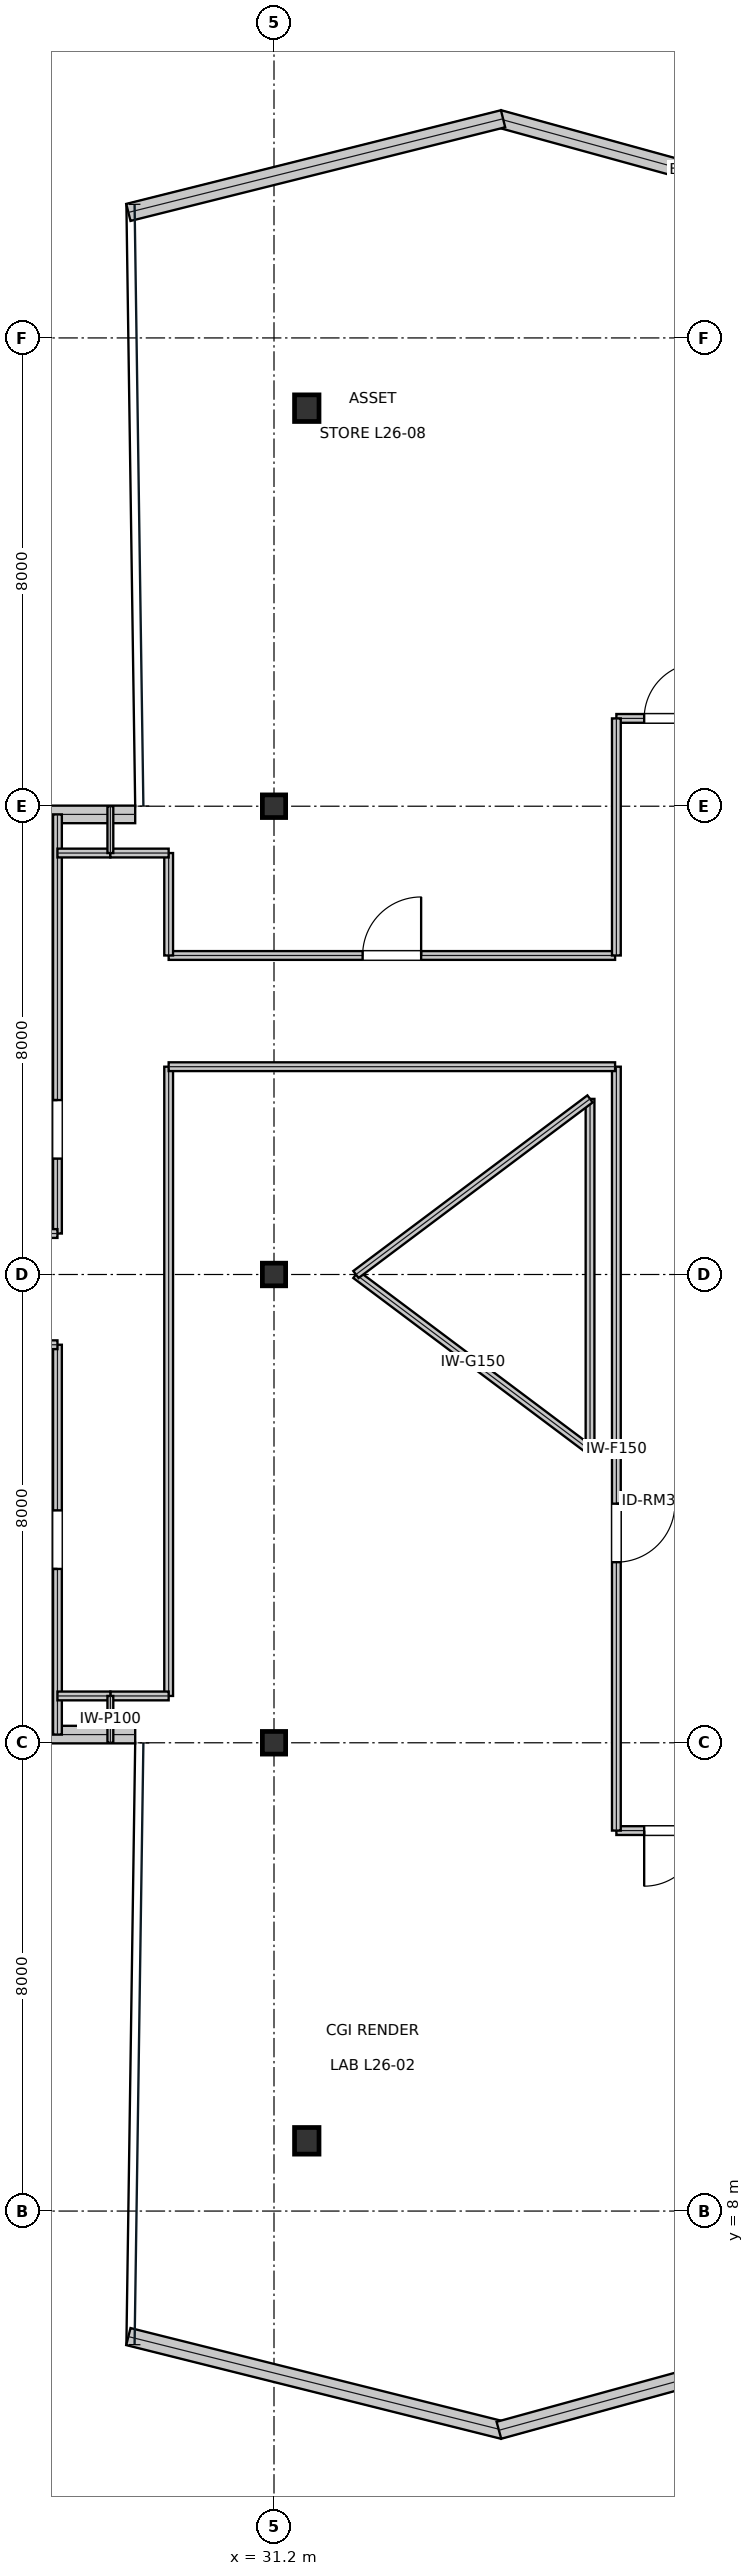
"""IFC4 building model, lengths in metres.
Left out: names, types, materials, properties, quantities, classifications, styles, units other than length and angle.
Written with IfcOpenShell. Run it as: python <this file> out.ifc"""

import sys

from ifc_helpers import new_model, si_unit, direction, frame, frame_2d, origin, origin_2d, place, context, subcontext, project, spatial, rectangle, i_section, extrude, element, fill, save


model = new_model("IFC4")
c1 = context("Model", 3, precision=1e-05, world=origin(), true_north=direction((0.0, 1.0)))
c2 = subcontext(c1, "Body", "Model", "MODEL_VIEW")
j1 = project(units=[si_unit("LENGTHUNIT", "METRE"), si_unit("PLANEANGLEUNIT", "RADIAN")], contexts=[c1])
p1 = place(None, origin())
s1 = spatial("IfcSite", under=j1, at=p1, CompositionType="ELEMENT")
p2 = place(p1, origin())
s2 = spatial("IfcBuilding", under=s1, at=p2, CompositionType="ELEMENT")
p3 = place(p2, frame((0.0, 0.0, 116.85)))
s3 = spatial("IfcBuildingStorey", under=s2, at=p3, CompositionType="ELEMENT", Elevation=116.85)
for number, where, z_axis, x_axis in (
    (1, (31.2, 16.0, 0.0), (0.0, 0.0, 1.0), (1.0, 0.0, 0.0)),
    (2, (31.2, 24.0, 0.0), (0.0, 0.0, 1.0), (1.0, 0.0, 0.0)),
    (3, (31.2, 32.0, 0.0), (0.0, 0.0, 1.0), (1.0, 0.0, 0.0)),
):
    element("IfcColumn", number, at=place(p3, frame(where, z_axis=z_axis, x_axis=x_axis)), inside=s3, PredefinedType="COLUMN", context=c2, shape_type="SweptSolid", body=[
        extrude(i_section(OverallWidth=0.398, OverallDepth=0.387, WebThickness=0.021, FlangeThickness=0.033, at=origin_2d()), origin(), (0.0, 0.0, 1.0), 4.044),
    ])
for number, where, z_axis, x_axis in (
    (4, (31.76, 38.8, 0.016), (0.0, 0.0, 1.0), (1.0, 0.0, 0.0)),
    (5, (31.76, 9.2, 0.016), (0.0, 0.0, 1.0), (1.0, 0.0, 0.0)),
):
    element("IfcColumn", number, at=place(p3, frame(where, z_axis=z_axis, x_axis=x_axis)), inside=s3, PredefinedType="COLUMN", context=c2, shape_type="SweptSolid", body=[
        extrude(i_section(OverallWidth=0.418, OverallDepth=0.455, WebThickness=0.042, FlangeThickness=0.068, at=origin_2d()), origin(), (0.0, 0.0, 1.0), 4.018),
    ])
p4 = place(p3, frame((41.445, 41.985, 0.0), z_axis=(0.0, 0.0, 1.0), x_axis=(-0.96422724659, 0.265077001894, 0.0)))
e6 = element("IfcWall", 6, at=p4, inside=s3, PredefinedType="STANDARD", context=c2, shape_type="SweptSolid", body=[
    extrude(rectangle(XDim=6.64, YDim=0.3, at=frame_2d((3.32, 0.0))), origin(), (0.0, 0.0, 1.0), 3.81),
])
p5 = place(p3, frame((35.114, 43.744, 0.0), z_axis=(0.0, 0.0, 1.0), x_axis=(-0.970168608955, -0.242431165897, 0.0)))
e7 = element("IfcWall", 7, at=p5, inside=s3, PredefinedType="STANDARD", context=c2, shape_type="SweptSolid", body=[
    extrude(rectangle(XDim=6.599, YDim=0.3, at=frame_2d((3.3, 0.0))), origin(), (0.0, 0.0, 1.0), 3.81),
])
for number, where, z_axis, x_axis in (
    (8, (28.828, 31.86, 0.0), (0.0, 0.0, 1.0), (-1.0, 0.0, 0.0)),
    (9, (26.04, 16.14, 0.0), (0.0, 0.0, 1.0), (1.0, 0.0, 0.0)),
):
    element("IfcWall", number, at=place(p3, frame(where, z_axis=z_axis, x_axis=x_axis)), inside=s3, PredefinedType="STANDARD", context=c2, shape_type="SweptSolid", body=[
        extrude(rectangle(XDim=2.788, YDim=0.3, at=frame_2d((1.394, 0.0))), origin(), (0.0, 0.0, 1.0), 3.81),
    ])
p6 = place(p3, frame((28.712, 5.856, 0.0), z_axis=(0.0, 0.0, 1.0), x_axis=(0.970168608955, -0.242431165897, 0.0)))
e10 = element("IfcWall", 10, at=p6, inside=s3, PredefinedType="STANDARD", context=c2, shape_type="SweptSolid", body=[
    extrude(rectangle(XDim=6.599, YDim=0.3, at=frame_2d((3.3, 0.0))), origin(), (0.0, 0.0, 1.0), 3.81),
])
p7 = place(p3, frame((35.043, 4.255, 0.0), z_axis=(0.0, 0.0, 1.0), x_axis=(0.96422724659, 0.265077001894, 0.0)))
e11 = element("IfcWall", 11, at=p7, inside=s3, PredefinedType="STANDARD", context=c2, shape_type="SweptSolid", body=[
    extrude(rectangle(XDim=6.64, YDim=0.3, at=frame_2d((3.32, 0.0))), origin(), (0.0, 0.0, 1.0), 3.81),
])
p8 = place(p3, frame((37.05, 14.5, 0.0), z_axis=(0.0, 0.0, 1.0), x_axis=(1.0, 0.0, 0.0)))
e12 = element("IfcWall", 12, at=p8, inside=s3, PredefinedType="PARTITIONING", context=c2, shape_type="SweptSolid", body=[
    extrude(rectangle(XDim=1.9, YDim=0.15, at=frame_2d((0.95, 0.0))), origin(), (0.0, 0.0, 1.0), 3.19),
])
p9 = place(p8, frame((0.475, 0.0, 0.0)))
e13 = element("IfcOpeningElement", 13, at=p9, cuts=e12, PredefinedType="OPENING", context=c2, shape_type="SweptSolid", body=[
    extrude(rectangle(XDim=0.95, YDim=2.15, at=frame_2d((0.475, 1.075))), frame((0.0, 0.085, 0.0), z_axis=(0.0, -1.0, 0.0), x_axis=(1.0, 0.0, 0.0)), (0.0, 0.0, 1.0), 0.17),
])
p10 = place(p3, frame((37.05, 14.5, 0.0), z_axis=(0.0, 0.0, 1.0), x_axis=(0.0, 1.0, 0.0)))
e14 = element("IfcWall", 14, at=p10, inside=s3, PredefinedType="PARTITIONING", context=c2, shape_type="SweptSolid", body=[
    extrude(rectangle(XDim=13.05, YDim=0.15, at=frame_2d((6.525, 0.0))), origin(), (0.0, 0.0, 1.0), 3.19),
])
p11 = place(p10, frame((4.585, 0.0, 0.0)))
e15 = element("IfcOpeningElement", 15, at=p11, cuts=e14, PredefinedType="OPENING", context=c2, shape_type="SweptSolid", body=[
    extrude(rectangle(XDim=1.0, YDim=2.15, at=frame_2d((0.5, 1.075))), frame((0.0, 0.085, 0.0), z_axis=(0.0, -1.0, 0.0), x_axis=(1.0, 0.0, 0.0)), (0.0, 0.0, 1.0), 0.17),
])
p12 = place(p3, frame((27.5, 16.14, 0.0), z_axis=(0.0, 0.0, 1.0), x_axis=(0.0, 1.0, 0.0)))
e16 = element("IfcWall", 16, at=p12, inside=s3, PredefinedType="PARTITIONING", context=c2, shape_type="SweptSolid", body=[
    extrude(rectangle(XDim=6.66, YDim=0.15, at=frame_2d((3.33, 0.0))), origin(), (0.0, 0.0, 1.0), 3.338),
])
p13 = place(p12, frame((2.83, 0.0, 0.0)))
e17 = element("IfcOpeningElement", 17, at=p13, cuts=e16, PredefinedType="OPENING", context=c2, shape_type="SweptSolid", body=[
    extrude(rectangle(XDim=1.0, YDim=2.15, at=frame_2d((0.5, 1.075))), frame((0.0, 0.085, 0.0), z_axis=(0.0, -1.0, 0.0), x_axis=(1.0, 0.0, 0.0)), (0.0, 0.0, 1.0), 0.17),
])
p14 = place(p3, frame((27.5, 24.7, 0.0), z_axis=(0.0, 0.0, 1.0), x_axis=(0.0, 1.0, 0.0)))
e18 = element("IfcWall", 18, at=p14, inside=s3, PredefinedType="PARTITIONING", context=c2, shape_type="SweptSolid", body=[
    extrude(rectangle(XDim=7.16, YDim=0.15, at=frame_2d((3.58, 0.0))), origin(), (0.0, 0.0, 1.0), 3.338),
])
p15 = place(p14, frame((1.28, 0.0, 0.0)))
e19 = element("IfcOpeningElement", 19, at=p15, cuts=e18, PredefinedType="OPENING", context=c2, shape_type="SweptSolid", body=[
    extrude(rectangle(XDim=1.0, YDim=2.15, at=frame_2d((0.5, 1.075))), frame((0.0, 0.085, 0.0), z_axis=(0.0, -1.0, 0.0), x_axis=(1.0, 0.0, 0.0)), (0.0, 0.0, 1.0), 0.17),
])
p16 = place(p3, frame((29.4, 29.45, 0.0), z_axis=(0.0, 0.0, 1.0), x_axis=(1.0, 0.0, 0.0)))
e20 = element("IfcWall", 20, at=p16, inside=s3, PredefinedType="PARTITIONING", context=c2, shape_type="SweptSolid", body=[
    extrude(rectangle(XDim=7.628, YDim=0.15, at=frame_2d((3.814, 0.0))), origin(), (0.0, 0.0, 1.0), 3.19),
])
p17 = place(p16, frame((3.314, 0.0, 0.0)))
e21 = element("IfcOpeningElement", 21, at=p17, cuts=e20, PredefinedType="OPENING", context=c2, shape_type="SweptSolid", body=[
    extrude(rectangle(XDim=1.0, YDim=2.15, at=frame_2d((0.5, 1.075))), frame((0.0, 0.085, 0.0), z_axis=(0.0, -1.0, 0.0), x_axis=(1.0, 0.0, 0.0)), (0.0, 0.0, 1.0), 0.17),
])
p18 = place(p3, frame((37.05, 33.5, 0.0), z_axis=(0.0, 0.0, 1.0), x_axis=(1.0, 0.0, 0.0)))
e22 = element("IfcWall", 22, at=p18, inside=s3, PredefinedType="PARTITIONING", context=c2, shape_type="SweptSolid", body=[
    extrude(rectangle(XDim=1.9, YDim=0.15, at=frame_2d((0.95, 0.0))), origin(), (0.0, 0.0, 1.0), 3.19),
])
p19 = place(p18, frame((0.475, 0.0, 0.0)))
e23 = element("IfcOpeningElement", 23, at=p19, cuts=e22, PredefinedType="OPENING", context=c2, shape_type="SweptSolid", body=[
    extrude(rectangle(XDim=0.95, YDim=2.15, at=frame_2d((0.475, 1.075))), frame((0.0, 0.085, 0.0), z_axis=(0.0, -1.0, 0.0), x_axis=(1.0, 0.0, 0.0)), (0.0, 0.0, 1.0), 0.17),
])
p20 = place(p3, frame((29.4, 16.8, 0.0), z_axis=(0.0, 0.0, 1.0), x_axis=(0.0, 1.0, 0.0)))
e24 = element("IfcWall", 24, at=p20, inside=s3, PredefinedType="PARTITIONING", context=c2, shape_type="SweptSolid", body=[
    extrude(rectangle(XDim=10.75, YDim=0.15, at=frame_2d((5.375, 0.0))), origin(), (0.0, 0.0, 1.0), 3.19),
])
p21 = place(p3, frame((29.4, 27.55, 0.0), z_axis=(0.0, 0.0, 1.0), x_axis=(1.0, 0.0, 0.0)))
e25 = element("IfcWall", 25, at=p21, inside=s3, PredefinedType="PARTITIONING", context=c2, shape_type="SweptSolid", body=[
    extrude(rectangle(XDim=7.628, YDim=0.15, at=frame_2d((3.814, 0.0))), origin(), (0.0, 0.0, 1.0), 3.19),
])
p22 = place(p3, frame((28.404, 16.8, 0.0), z_axis=(0.0, 0.0, 1.0), x_axis=(1.0, 0.0, 0.0)))
e26 = element("IfcWall", 26, at=p22, inside=s3, PredefinedType="PARTITIONING", context=c2, shape_type="SweptSolid", body=[
    extrude(rectangle(XDim=0.996, YDim=0.15, at=frame_2d((0.498, 0.0))), origin(), (0.0, 0.0, 1.0), 3.81),
])
p23 = place(p3, frame((23.1, 22.8, 0.0), z_axis=(0.0, 0.0, 1.0), x_axis=(1.0, 0.0, 0.0)))
e27 = element("IfcWall", 27, at=p23, inside=s3, PredefinedType="PARTITIONING", context=c2, shape_type="SweptSolid", body=[
    extrude(rectangle(XDim=4.4, YDim=0.15, at=frame_2d((2.2, 0.0))), origin(), (0.0, 0.0, 1.0), 3.19),
])
p24 = place(p3, frame((27.5, 16.8, 0.0), z_axis=(0.0, 0.0, 1.0), x_axis=(1.0, 0.0, 0.0)))
e28 = element("IfcWall", 28, at=p24, inside=s3, PredefinedType="PARTITIONING", context=c2, shape_type="SweptSolid", body=[
    extrude(rectangle(XDim=0.904, YDim=0.15, at=frame_2d((0.452, 0.0))), origin(), (0.0, 0.0, 1.0), 3.338),
])
p25 = place(p3, frame((23.1, 24.7, 0.0), z_axis=(0.0, 0.0, 1.0), x_axis=(1.0, 0.0, 0.0)))
e29 = element("IfcWall", 29, at=p25, inside=s3, PredefinedType="PARTITIONING", context=c2, shape_type="SweptSolid", body=[
    extrude(rectangle(XDim=4.4, YDim=0.15, at=frame_2d((2.2, 0.0))), origin(), (0.0, 0.0, 1.0), 3.19),
])
p26 = place(p3, frame((27.5, 31.2, 0.0), z_axis=(0.0, 0.0, 1.0), x_axis=(1.0, 0.0, 0.0)))
e30 = element("IfcWall", 30, at=p26, inside=s3, PredefinedType="PARTITIONING", context=c2, shape_type="SweptSolid", body=[
    extrude(rectangle(XDim=0.904, YDim=0.15, at=frame_2d((0.452, 0.0))), origin(), (0.0, 0.0, 1.0), 3.338),
])
p27 = place(p3, frame((37.05, 29.45, 0.0), z_axis=(0.0, 0.0, 1.0), x_axis=(0.0, 1.0, 0.0)))
e31 = element("IfcWall", 31, at=p27, inside=s3, PredefinedType="PARTITIONING", context=c2, shape_type="SweptSolid", body=[
    extrude(rectangle(XDim=4.05, YDim=0.15, at=frame_2d((2.025, 0.0))), origin(), (0.0, 0.0, 1.0), 3.19),
])
p28 = place(p3, frame((29.4, 29.45, 0.0), z_axis=(0.0, 0.0, 1.0), x_axis=(0.0, 1.0, 0.0)))
e32 = element("IfcWall", 32, at=p28, inside=s3, PredefinedType="PARTITIONING", context=c2, shape_type="SweptSolid", body=[
    extrude(rectangle(XDim=1.75, YDim=0.15, at=frame_2d((0.875, 0.0))), origin(), (0.0, 0.0, 1.0), 3.81),
])
p29 = place(p3, frame((28.404, 31.2, 0.0), z_axis=(0.0, 0.0, 1.0), x_axis=(1.0, 0.0, 0.0)))
e33 = element("IfcWall", 33, at=p29, inside=s3, PredefinedType="PARTITIONING", context=c2, shape_type="SweptSolid", body=[
    extrude(rectangle(XDim=0.996, YDim=0.15, at=frame_2d((0.498, 0.0))), origin(), (0.0, 0.0, 1.0), 3.81),
])
for number, where, z_axis, x_axis in (
    (34, (28.404, 16.0, 0.0), (0.0, 0.0, 1.0), (0.0, 1.0, 0.0)),
    (35, (28.404, 31.2, 0.0), (0.0, 0.0, 1.0), (0.0, 1.0, 0.0)),
):
    element("IfcWall", number, at=place(p3, frame(where, z_axis=z_axis, x_axis=x_axis)), inside=s3, PredefinedType="PARTITIONING", context=c2, shape_type="SweptSolid", body=[
        extrude(rectangle(XDim=0.8, YDim=0.1, at=frame_2d((0.4, 0.0))), origin(), (0.0, 0.0, 1.0), 3.338),
    ])
p30 = place(p3, frame((32.6, 24.0, 0.0), z_axis=(0.0, 0.0, 1.0), x_axis=(0.8, -0.6, 0.0)))
e36 = element("IfcWall", 36, at=p30, inside=s3, PredefinedType="MOVABLE", context=c2, shape_type="SweptSolid", body=[
    extrude(rectangle(XDim=5.0, YDim=0.15, at=frame_2d((2.5, 0.0))), origin(), (0.0, 0.0, 1.0), 3.81),
])
p31 = place(p3, frame((36.6, 21.0, 0.0), z_axis=(0.0, 0.0, 1.0), x_axis=(0.0, 1.0, 0.0)))
e37 = element("IfcWall", 37, at=p31, inside=s3, PredefinedType="MOVABLE", context=c2, shape_type="SweptSolid", body=[
    extrude(rectangle(XDim=6.0, YDim=0.15, at=frame_2d((3.0, 0.0))), origin(), (0.0, 0.0, 1.0), 3.81),
])
p32 = place(p3, frame((36.6, 27.0, 0.0), z_axis=(0.0, 0.0, 1.0), x_axis=(-0.8, -0.6, 0.0)))
e38 = element("IfcWall", 38, at=p32, inside=s3, PredefinedType="MOVABLE", context=c2, shape_type="SweptSolid", body=[
    extrude(rectangle(XDim=5.0, YDim=0.15, at=frame_2d((2.5, 0.0))), origin(), (0.0, 0.0, 1.0), 3.81),
])
p33 = place(p9, frame((0.95, 0.0, 0.0), z_axis=(0.0, 0.0, 1.0), x_axis=(-1.0, 0.0, 0.0)))
e39 = element("IfcDoor", 39, at=p33, inside=s3, OperationType="SINGLE_SWING_RIGHT", PredefinedType="DOOR", context=c2, shape_type="SweptSolid", body=[
    extrude(rectangle(XDim=0.95, YDim=2.15, at=frame_2d((0.475, 1.075))), frame((0.0, 0.025, 0.0), z_axis=(0.0, -1.0, 0.0), x_axis=(1.0, 0.0, 0.0)), (0.0, 0.0, 1.0), 0.05),
])
fill(e13, e39)
p34 = place(p11, frame((1.0, 0.0, 0.0), z_axis=(0.0, 0.0, 1.0), x_axis=(-1.0, 0.0, 0.0)))
e40 = element("IfcDoor", 40, at=p34, inside=s3, OperationType="SINGLE_SWING_LEFT", PredefinedType="DOOR", context=c2, shape_type="SweptSolid", body=[
    extrude(rectangle(XDim=1.0, YDim=2.15, at=frame_2d((0.5, 1.075))), frame((0.0, 0.025, 0.0), z_axis=(0.0, -1.0, 0.0), x_axis=(1.0, 0.0, 0.0)), (0.0, 0.0, 1.0), 0.05),
])
fill(e15, e40)
p35 = place(p13, origin())
e41 = element("IfcDoor", 41, at=p35, inside=s3, OperationType="SINGLE_SWING_LEFT", PredefinedType="DOOR", context=c2, shape_type="SweptSolid", body=[
    extrude(rectangle(XDim=1.0, YDim=2.15, at=frame_2d((0.5, 1.075))), frame((0.0, 0.025, 0.0), z_axis=(0.0, -1.0, 0.0), x_axis=(1.0, 0.0, 0.0)), (0.0, 0.0, 1.0), 0.05),
])
fill(e17, e41)
p36 = place(p15, origin())
e42 = element("IfcDoor", 42, at=p36, inside=s3, OperationType="SINGLE_SWING_RIGHT", PredefinedType="DOOR", context=c2, shape_type="SweptSolid", body=[
    extrude(rectangle(XDim=1.0, YDim=2.15, at=frame_2d((0.5, 1.075))), frame((0.0, 0.025, 0.0), z_axis=(0.0, -1.0, 0.0), x_axis=(1.0, 0.0, 0.0)), (0.0, 0.0, 1.0), 0.05),
])
fill(e19, e42)
p37 = place(p17, origin())
e43 = element("IfcDoor", 43, at=p37, inside=s3, OperationType="SINGLE_SWING_RIGHT", PredefinedType="DOOR", context=c2, shape_type="SweptSolid", body=[
    extrude(rectangle(XDim=1.0, YDim=2.15, at=frame_2d((0.5, 1.075))), frame((0.0, 0.025, 0.0), z_axis=(0.0, -1.0, 0.0), x_axis=(1.0, 0.0, 0.0)), (0.0, 0.0, 1.0), 0.05),
])
fill(e21, e43)
p38 = place(p19, origin())
e44 = element("IfcDoor", 44, at=p38, inside=s3, OperationType="SINGLE_SWING_RIGHT", PredefinedType="DOOR", context=c2, shape_type="SweptSolid", body=[
    extrude(rectangle(XDim=0.95, YDim=2.15, at=frame_2d((0.475, 1.075))), frame((0.0, 0.025, 0.0), z_axis=(0.0, -1.0, 0.0), x_axis=(1.0, 0.0, 0.0)), (0.0, 0.0, 1.0), 0.05),
])
fill(e23, e44)
save(model, sys.argv[1])
